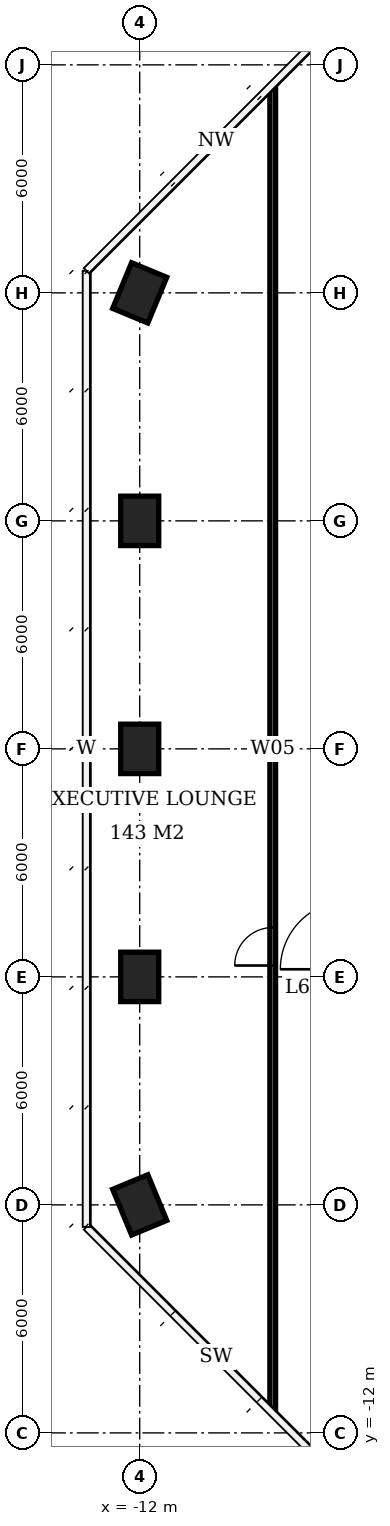
"""IFC4 building model, lengths in metres.
Left out: names, types, materials, properties, quantities, classifications, styles, units other than length and angle.
Written with IfcOpenShell. Run it as: python <this file> out.ifc"""

import sys

from ifc_helpers import new_model, si_unit, direction, frame, frame_2d, origin, origin_2d, place, context, subcontext, project, spatial, rectangle, extrude, element, fill, save


model = new_model("IFC4")
c1 = context("Model", 3, precision=1e-05, world=origin(), true_north=direction((0.0, 1.0)))
c2 = subcontext(c1, "Body", "Model", "MODEL_VIEW")
j1 = project(units=[si_unit("LENGTHUNIT", "METRE"), si_unit("PLANEANGLEUNIT", "RADIAN")], contexts=[c1])
p1 = place(None, origin())
s1 = spatial("IfcSite", under=j1, at=p1, CompositionType="ELEMENT")
p2 = place(p1, origin())
s2 = spatial("IfcBuilding", under=s1, at=p2, CompositionType="ELEMENT")
p3 = place(p2, frame((0.0, 0.0, 256.7)))
s3 = spatial("IfcBuildingStorey", under=s2, at=p3, CompositionType="ELEMENT", Elevation=256.7)
for number, where, z_axis, x_axis in (
    (1, (-12.0, -6.0, 0.0), (0.0, 0.0, 1.0), (-0.383, 0.924, 0.0)),
    (2, (-12.0, 0.0, 0.0), (0.0, 0.0, 1.0), (0.0, 1.0, 0.0)),
    (3, (-12.0, 6.0, 0.0), (0.0, 0.0, 1.0), (0.0, 1.0, 0.0)),
    (4, (-12.0, 12.0, 0.0), (0.0, 0.0, 1.0), (0.0, 1.0, 0.0)),
    (5, (-12.0, 18.0, 0.0), (0.0, 0.0, 1.0), (0.383, 0.924, 0.0)),
):
    element("IfcColumn", number, at=place(p3, frame(where, z_axis=z_axis, x_axis=x_axis)), inside=s3, PredefinedType="COLUMN", context=c2, shape_type="SweptSolid", body=[
        extrude(rectangle(XDim=1.3, YDim=1.0, at=origin_2d()), origin(), (0.0, 0.0, 1.0), 3.9),
    ])
p4 = place(p3, frame((-8.5, -11.363, 0.0), z_axis=(0.0, 0.0, 1.0), x_axis=(0.0, 1.0, 0.0)))
e6 = element("IfcWall", 6, at=p4, inside=s3, PredefinedType="PARTITIONING", context=c2, shape_type="SweptSolid", body=[
    extrude(rectangle(XDim=34.726, YDim=0.15, at=frame_2d((17.363, 0.0))), origin(), (0.0, 0.0, 1.0), 3.65),
])
p5 = place(p4, frame((11.662, 0.0, 0.0)))
e7 = element("IfcOpeningElement", 7, at=p5, cuts=e6, PredefinedType="OPENING", context=c2, shape_type="SweptSolid", body=[
    extrude(rectangle(XDim=1.0, YDim=2.4, at=frame_2d((0.5, 1.2))), frame((0.0, 0.085, 0.0), z_axis=(0.0, -1.0, 0.0), x_axis=(1.0, 0.0, 0.0)), (0.0, 0.0, 1.0), 0.17),
])
p6 = place(p5, origin())
e8 = element("IfcDoor", 8, at=p6, inside=s3, OperationType="SINGLE_SWING_LEFT", PredefinedType="DOOR", context=c2, shape_type="SweptSolid", body=[
    extrude(rectangle(XDim=1.0, YDim=2.4, at=frame_2d((0.5, 1.2))), frame((0.0, 0.025, 0.0), z_axis=(0.0, -1.0, 0.0), x_axis=(1.0, 0.0, 0.0)), (0.0, 0.0, 1.0), 0.05),
])
fill(e7, e8)
save(model, sys.argv[1])
